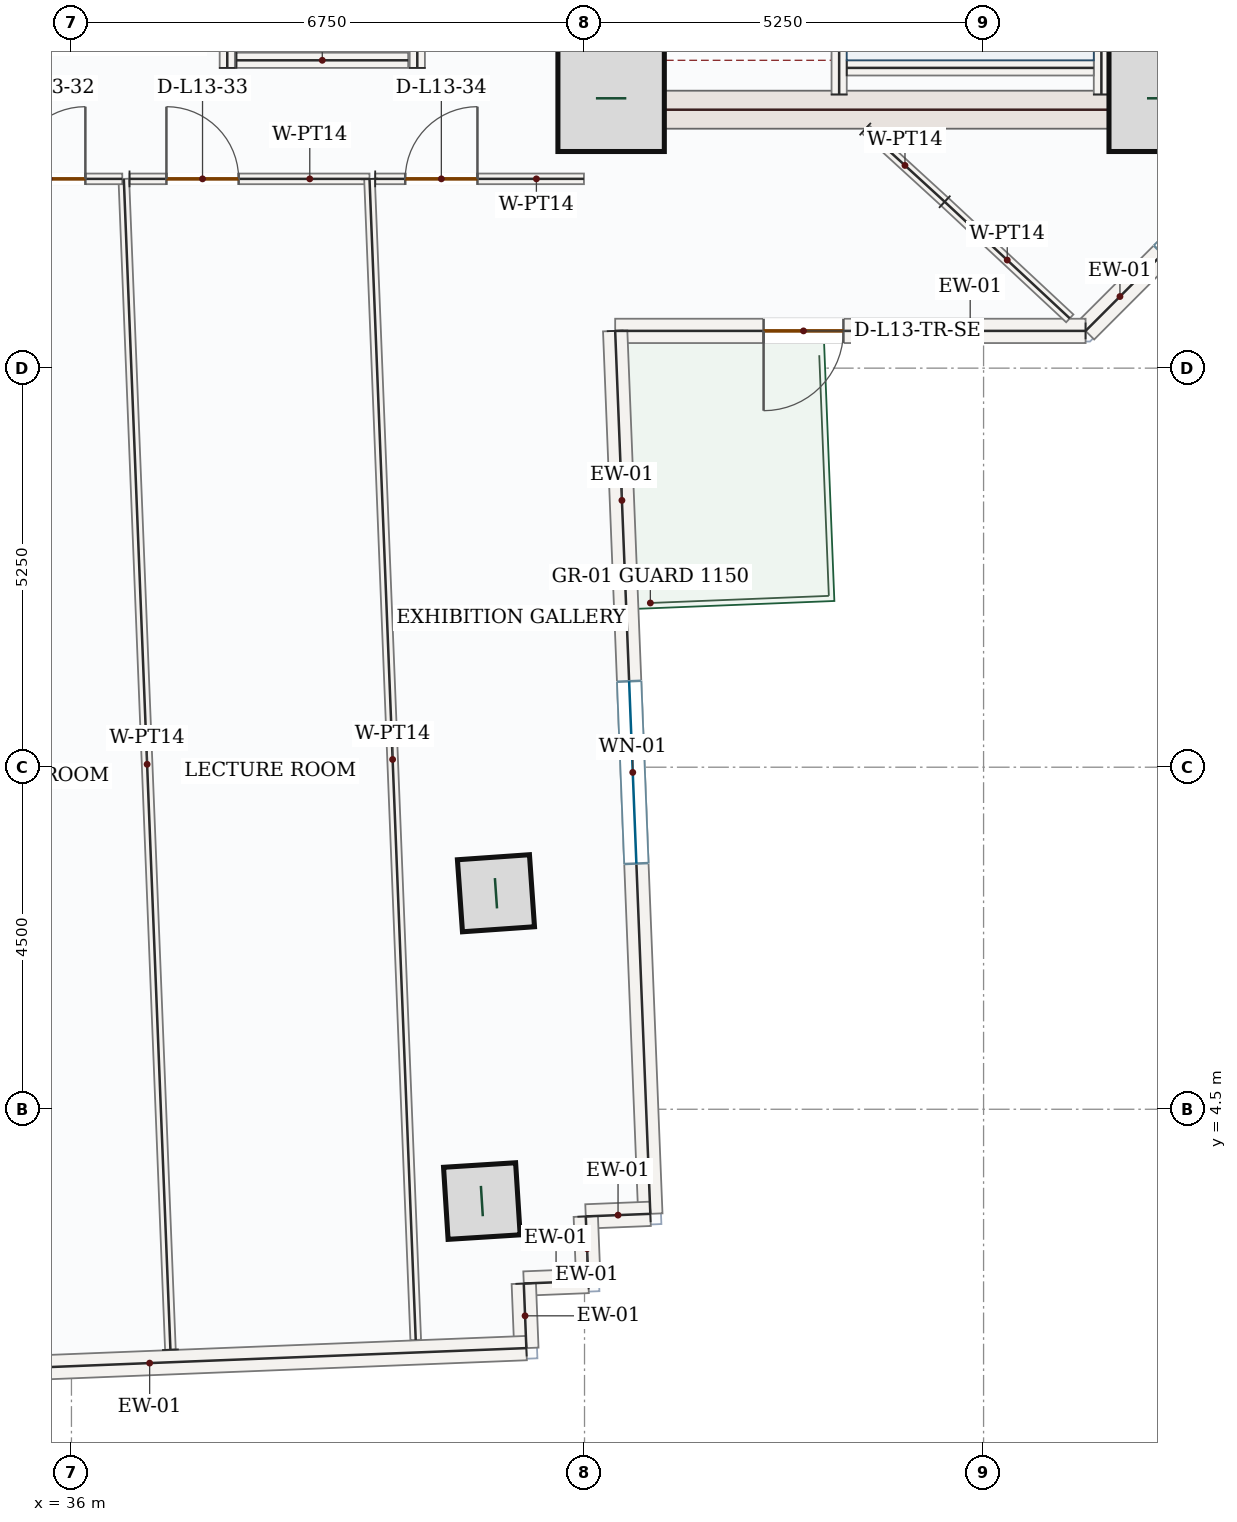
"""IFC4 building model, lengths in metres.
Left out: names, types, materials, properties, quantities, classifications, styles, units other than length and angle.
Written with IfcOpenShell. Run it as: python <this file> out.ifc"""

import sys

from ifc_helpers import new_model, si_unit, direction, frame, frame_2d, origin, origin_2d, place, context, subcontext, project, spatial, rectangle, hollow_rectangle, extrude, source, transform, mapped, element, fill, save


model = new_model("IFC4")
c1 = context("Model", 3, precision=1e-05, world=origin(), true_north=direction((0.0, 1.0)))
c2 = subcontext(c1, "Body", "Model", "MODEL_VIEW")
j1 = project(units=[si_unit("LENGTHUNIT", "METRE"), si_unit("PLANEANGLEUNIT", "RADIAN")], contexts=[c1])
p1 = place(None, origin())
s1 = spatial("IfcSite", under=j1, at=p1, CompositionType="ELEMENT")
p2 = place(p1, origin())
s2 = spatial("IfcBuilding", under=s1, at=p2, CompositionType="ELEMENT")
p3 = place(p2, frame((0.0, 0.0, 62.7)))
s3 = spatial("IfcBuildingStorey", under=s2, at=p3, CompositionType="ELEMENT", Elevation=62.7)
p4 = place(p3, frame((43.0, 17.4, 0.0), z_axis=(0.0, 0.0, 1.0), x_axis=(0.0, 1.0, 0.0)))
e1 = element("IfcWall", 1, at=p4, inside=s3, PredefinedType="SHEAR", context=c2, shape_type="SweptSolid", body=[
    extrude(rectangle(XDim=8.55, YDim=0.5, at=frame_2d((4.275, 0.0))), origin(), (0.0, 0.0, 1.0), 3.95),
])
p5 = place(p4, frame((6.65, 0.0, 0.0)))
e2 = element("IfcOpeningElement", 2, at=p5, cuts=e1, PredefinedType="OPENING", context=c2, shape_type="SweptSolid", body=[
    extrude(rectangle(XDim=1.1, YDim=2.2, at=frame_2d((0.55, 1.1))), frame((0.0, 0.26, 0.0), z_axis=(0.0, -1.0, 0.0), x_axis=(1.0, 0.0, 0.0)), (0.0, 0.0, 1.0), 0.52),
])
p6 = place(p4, frame((1.75, 0.0, 0.0)))
e3 = element("IfcOpeningElement", 3, at=p6, cuts=e1, PredefinedType="OPENING", context=c2, shape_type="SweptSolid", body=[
    extrude(rectangle(XDim=1.3, YDim=2.2, at=frame_2d((0.65, 1.1))), frame((0.0, 0.26, 0.0), z_axis=(0.0, -1.0, 0.0), x_axis=(1.0, 0.0, 0.0)), (0.0, 0.0, 1.0), 0.52),
])
p7 = place(p4, frame((4.3, 0.0, 0.0)))
e4 = element("IfcOpeningElement", 4, at=p7, cuts=e1, PredefinedType="OPENING", context=c2, shape_type="SweptSolid", body=[
    extrude(rectangle(XDim=0.88, YDim=2.1, at=frame_2d((0.44, 1.05))), frame((0.0, 0.26, 0.0), z_axis=(0.0, -1.0, 0.0), x_axis=(1.0, 0.0, 0.0)), (0.0, 0.0, 1.0), 0.52),
])
m1 = source(origin(), c2, "Body", "SweptSolid", [
    extrude(rectangle(XDim=8.55, YDim=0.5, at=frame_2d((4.275, 0.0))), origin(), (0.0, 0.0, 1.0), 3.95),
])
p8 = place(p3, frame((50.5, 17.4, 0.0), z_axis=(0.0, 0.0, 1.0), x_axis=(0.0, 1.0, 0.0)))
e5 = element("IfcWall", 5, at=p8, inside=s3, PredefinedType="SHEAR", context=c2, shape_type="MappedRepresentation", body=[
    mapped(m1, transform((0.0, 0.0, 0.0), x_axis=(1.0, 0.0, 0.0), y_axis=(0.0, 1.0, 0.0), z_axis=(0.0, 0.0, 1.0), scale=1.0)),
])
m2 = source(origin(), c2, "Body", "SweptSolid", [
    extrude(rectangle(XDim=7.0, YDim=0.5, at=frame_2d((3.5, 0.0))), origin(), (0.0, 0.0, 1.0), 3.95),
])
p9 = place(p3, frame((43.25, 17.65, 0.0), z_axis=(0.0, 0.0, 1.0), x_axis=(1.0, 0.0, 0.0)))
e6 = element("IfcWall", 6, at=p9, inside=s3, PredefinedType="SHEAR", context=c2, shape_type="MappedRepresentation", body=[
    mapped(m2, transform((0.0, 0.0, 0.0), x_axis=(1.0, 0.0, 0.0), y_axis=(0.0, 1.0, 0.0), z_axis=(0.0, 0.0, 1.0), scale=1.0)),
])
m3 = source(origin(), c2, "Body", "SweptSolid", [
    extrude(rectangle(XDim=1.4, YDim=1.4, at=origin_2d()), origin(), (0.0, 0.0, 1.0), 4.2),
])
for number, where, z_axis, x_axis in (
    (7, (43.1, 17.8, 0.0), (0.0, 0.0, 1.0), (1.0, 0.0, 0.0)),
    (8, (50.35, 17.8, 0.0), (0.0, 0.0, 1.0), (1.0, 0.0, 0.0)),
):
    element("IfcColumn", number, at=place(p3, frame(where, z_axis=z_axis, x_axis=x_axis)), inside=s3, PredefinedType="COLUMN", context=c2, shape_type="MappedRepresentation", body=[
        mapped(m3, transform((0.0, 0.0, 0.0), x_axis=(1.0, 0.0, 0.0), y_axis=(0.0, 1.0, 0.0), z_axis=(0.0, 0.0, 1.0), scale=1.0)),
    ])
m4 = source(origin(), c2, "Body", "SweptSolid", [
    extrude(hollow_rectangle(XDim=0.95, YDim=0.95, WallThickness=0.05, at=origin_2d()), origin(), (0.0, 0.0, 1.0), 4.2),
])
for number, where, z_axis, x_axis in (
    (9, (41.585, 7.342, 0.0), (0.0, 0.0, 1.0), (-0.07, 0.998, 0.0)),
    (10, (41.399, 3.292, 0.0), (0.0, 0.0, 1.0), (-0.063, 0.998, 0.0)),
):
    element("IfcColumn", number, at=place(p3, frame(where, z_axis=z_axis, x_axis=x_axis)), inside=s3, PredefinedType="COLUMN", context=c2, shape_type="MappedRepresentation", body=[
        mapped(m4, transform((0.0, 0.0, 0.0), x_axis=(1.0, 0.0, 0.0), y_axis=(0.0, 1.0, 0.0), z_axis=(0.0, 0.0, 1.0), scale=1.0)),
    ])
p10 = place(p3, frame((53.06, 18.458, 0.0), z_axis=(0.0, 0.0, 1.0), x_axis=(-0.707106781187, -0.707106781187, 0.0)))
e11 = element("IfcWall", 11, at=p10, inside=s3, PredefinedType="SOLIDWALL", context=c2, shape_type="SweptSolid", body=[
    extrude(rectangle(XDim=5.258, YDim=0.32, at=frame_2d((2.629, 0.0))), origin(), (0.0, 0.0, 1.0), 3.95),
])
p11 = place(p10, frame((1.429, 0.0, 0.85)))
e12 = element("IfcOpeningElement", 12, at=p11, cuts=e11, PredefinedType="OPENING", context=c2, shape_type="SweptSolid", body=[
    extrude(rectangle(XDim=2.4, YDim=1.8, at=frame_2d((1.2, 0.9))), frame((0.0, 0.17, 0.0), z_axis=(0.0, -1.0, 0.0), x_axis=(1.0, 0.0, 0.0)), (0.0, 0.0, 1.0), 0.34),
])
p12 = place(p3, frame((49.342, 14.74, 0.0), z_axis=(0.0, 0.0, 1.0), x_axis=(-1.0, 0.0, 0.0)))
e13 = element("IfcWall", 13, at=p12, inside=s3, PredefinedType="SOLIDWALL", context=c2, shape_type="SweptSolid", body=[
    extrude(rectangle(XDim=6.189, YDim=0.32, at=frame_2d((3.094, 0.0))), origin(), (0.0, 0.0, 1.0), 3.95),
])
p13 = place(p12, frame((3.186, 0.0, 0.0)))
e14 = element("IfcOpeningElement", 14, at=p13, cuts=e13, PredefinedType="OPENING", context=c2, shape_type="SweptSolid", body=[
    extrude(rectangle(XDim=1.05, YDim=2.15, at=frame_2d((0.525, 1.075))), frame((0.0, 0.17, 0.0), z_axis=(0.0, -1.0, 0.0), x_axis=(1.0, 0.0, 0.0)), (0.0, 0.0, 1.0), 0.34),
])
p14 = place(p3, frame((43.153, 14.74, 0.0), z_axis=(0.0, 0.0, 1.0), x_axis=(0.039775975357, -0.999208622753, 0.0)))
e15 = element("IfcWall", 15, at=p14, inside=s3, PredefinedType="SOLIDWALL", context=c2, shape_type="SweptSolid", body=[
    extrude(rectangle(XDim=11.625, YDim=0.32, at=frame_2d((5.812, 0.0))), origin(), (0.0, 0.0, 1.0), 3.95),
])
p15 = place(p14, frame((4.613, 0.0, 0.85)))
e16 = element("IfcOpeningElement", 16, at=p15, cuts=e15, PredefinedType="OPENING", context=c2, shape_type="SweptSolid", body=[
    extrude(rectangle(XDim=2.4, YDim=1.8, at=frame_2d((1.2, 0.9))), frame((0.0, 0.17, 0.0), z_axis=(0.0, -1.0, 0.0), x_axis=(1.0, 0.0, 0.0)), (0.0, 0.0, 1.0), 0.34),
])
m5 = source(origin(), c2, "Body", "SweptSolid", [
    extrude(rectangle(XDim=0.85, YDim=0.32, at=frame_2d((0.425, 0.0))), origin(), (0.0, 0.0, 1.0), 3.95),
])
for number, where, z_axis, x_axis in (
    (17, (43.616, 3.124, 0.0), (0.0, 0.0, 1.0), (-0.999, -0.04, 0.0)),
    (18, (42.767, 3.09, 0.0), (0.0, 0.0, 1.0), (0.04, -0.999, 0.0)),
):
    element("IfcWall", number, at=place(p3, frame(where, z_axis=z_axis, x_axis=x_axis)), inside=s3, PredefinedType="SOLIDWALL", context=c2, shape_type="MappedRepresentation", body=[
        mapped(m5, transform((0.0, 0.0, 0.0), x_axis=(1.0, 0.0, 0.0), y_axis=(0.0, 1.0, 0.0), z_axis=(0.0, 0.0, 1.0), scale=1.0)),
    ])
m6 = source(origin(), c2, "Body", "SweptSolid", [
    extrude(rectangle(XDim=0.85, YDim=0.32, at=frame_2d((0.425, 0.0))), origin(), (0.0, 0.0, 1.0), 3.95),
])
p16 = place(p3, frame((42.8, 2.241, 0.0), z_axis=(0.0, 0.0, 1.0), x_axis=(-0.999202792875, -0.039922158152, 0.0)))
e19 = element("IfcWall", 19, at=p16, inside=s3, PredefinedType="SOLIDWALL", context=c2, shape_type="MappedRepresentation", body=[
    mapped(m6, transform((0.0, 0.0, 0.0), x_axis=(1.0, 0.0, 0.0), y_axis=(0.0, 1.0, 0.0), z_axis=(0.0, 0.0, 1.0), scale=1.0)),
])
p17 = place(p3, frame((41.951, 2.207, 0.0), z_axis=(0.0, 0.0, 1.0), x_axis=(0.039933618331, -0.999202334929, 0.0)))
e20 = element("IfcWall", 20, at=p17, inside=s3, PredefinedType="SOLIDWALL", context=c2, shape_type="MappedRepresentation", body=[
    mapped(m5, transform((0.0, 0.0, 0.0), x_axis=(1.0, 0.0, 0.0), y_axis=(0.0, 1.0, 0.0), z_axis=(0.0, 0.0, 1.0), scale=1.0)),
])
m7 = source(origin(), c2, "Body", "SweptSolid", [
    extrude(rectangle(XDim=9.92, YDim=0.32, at=frame_2d((4.96, 0.0))), origin(), (0.0, 0.0, 1.0), 3.95),
])
p18 = place(p3, frame((41.985, 1.358, 0.0), z_axis=(0.0, 0.0, 1.0), x_axis=(-0.999207823998, -0.039796035749, 0.0)))
e21 = element("IfcWall", 21, at=p18, inside=s3, PredefinedType="SOLIDWALL", context=c2, shape_type="MappedRepresentation", body=[
    mapped(m7, transform((0.0, 0.0, 0.0), x_axis=(1.0, 0.0, 0.0), y_axis=(0.0, 1.0, 0.0), z_axis=(0.0, 0.0, 1.0), scale=1.0)),
])
m8 = source(origin(), c2, "Body", "SweptSolid", [
    extrude(rectangle(XDim=7.87, YDim=0.2, at=frame_2d((3.935, 0.0))), origin(), (0.0, 0.0, 1.0), 3.95),
])
p19 = place(p3, frame((49.55, 17.85, 0.0), z_axis=(0.0, 0.0, 1.0), x_axis=(0.0, 1.0, 0.0)))
e22 = element("IfcWall", 22, at=p19, inside=s3, PredefinedType="SOLIDWALL", context=c2, shape_type="MappedRepresentation", body=[
    mapped(m8, transform((0.0, 0.0, 0.0), x_axis=(1.0, 0.0, 0.0), y_axis=(0.0, 1.0, 0.0), z_axis=(0.0, 0.0, 1.0), scale=1.0)),
])
p20 = place(p3, frame((46.1, 17.85, 0.0), z_axis=(0.0, 0.0, 1.0), x_axis=(0.0, 1.0, 0.0)))
e23 = element("IfcWall", 23, at=p20, inside=s3, PredefinedType="SOLIDWALL", context=c2, shape_type="SweptSolid", body=[
    extrude(rectangle(XDim=8.0, YDim=0.2, at=frame_2d((4.0, 0.0))), origin(), (0.0, 0.0, 1.0), 3.95),
])
p21 = place(p20, frame((6.3, 0.0, 0.0)))
e24 = element("IfcOpeningElement", 24, at=p21, cuts=e23, PredefinedType="OPENING", context=c2, shape_type="SweptSolid", body=[
    extrude(rectangle(XDim=1.05, YDim=2.15, at=frame_2d((0.525, 1.075))), frame((0.0, 0.11, 0.0), z_axis=(0.0, -1.0, 0.0), x_axis=(1.0, 0.0, 0.0)), (0.0, 0.0, 1.0), 0.22),
])
m9 = source(origin(), c2, "Body", "SweptSolid", [
    extrude(rectangle(XDim=3.25, YDim=0.2, at=frame_2d((1.625, 0.0))), origin(), (0.0, 0.0, 1.0), 3.95),
])
p22 = place(p3, frame((46.2, 18.2, 0.0), z_axis=(0.0, 0.0, 1.0), x_axis=(1.0, 0.0, 0.0)))
e25 = element("IfcWall", 25, at=p22, inside=s3, PredefinedType="SOLIDWALL", context=c2, shape_type="MappedRepresentation", body=[
    mapped(m9, transform((0.0, 0.0, 0.0), x_axis=(1.0, 0.0, 0.0), y_axis=(0.0, 1.0, 0.0), z_axis=(0.0, 0.0, 1.0), scale=1.0)),
])
m10 = source(origin(), c2, "Body", "SweptSolid", [
    extrude(rectangle(XDim=2.35, YDim=0.2, at=frame_2d((1.175, 0.0))), origin(), (0.0, 0.0, 1.0), 3.95),
])
for number, where, z_axis, x_axis in (
    (26, (38.05, 18.2, 0.0), (0.0, 0.0, 1.0), (0.0, 1.0, 0.0)),
    (27, (40.55, 18.2, 0.0), (0.0, 0.0, 1.0), (0.0, 1.0, 0.0)),
):
    element("IfcWall", number, at=place(p3, frame(where, z_axis=z_axis, x_axis=x_axis)), inside=s3, PredefinedType="SOLIDWALL", context=c2, shape_type="MappedRepresentation", body=[
        mapped(m10, transform((0.0, 0.0, 0.0), x_axis=(1.0, 0.0, 0.0), y_axis=(0.0, 1.0, 0.0), z_axis=(0.0, 0.0, 1.0), scale=1.0)),
    ])
m11 = source(origin(), c2, "Body", "SweptSolid", [
    extrude(rectangle(XDim=2.26, YDim=0.2, at=frame_2d((1.13, 0.0))), origin(), (0.0, 0.0, 1.0), 3.95),
])
p23 = place(p3, frame((38.17, 18.3, 0.0), z_axis=(0.0, 0.0, 1.0), x_axis=(1.0, 0.0, 0.0)))
e28 = element("IfcWall", 28, at=p23, inside=s3, PredefinedType="SOLIDWALL", context=c2, shape_type="MappedRepresentation", body=[
    mapped(m11, transform((0.0, 0.0, 0.0), x_axis=(1.0, 0.0, 0.0), y_axis=(0.0, 1.0, 0.0), z_axis=(0.0, 0.0, 1.0), scale=1.0)),
])
m12 = source(origin(), c2, "Body", "SweptSolid", [
    extrude(rectangle(XDim=15.416, YDim=0.14, at=frame_2d((7.708, 0.0))), origin(), (0.0, 0.0, 1.0), 3.95),
])
p24 = place(p3, frame((37.302, 1.336, 0.0), z_axis=(0.0, 0.0, 1.0), x_axis=(-0.039782723686, 0.999208354096, 0.0)))
e29 = element("IfcWall", 29, at=p24, inside=s3, PredefinedType="PARTITIONING", context=c2, shape_type="MappedRepresentation", body=[
    mapped(m12, transform((0.0, 0.0, 0.0), x_axis=(1.0, 0.0, 0.0), y_axis=(0.0, 1.0, 0.0), z_axis=(0.0, 0.0, 1.0), scale=1.0)),
])
p25 = place(p3, frame((36.764, 16.74, 0.0), z_axis=(0.0, 0.0, 1.0), x_axis=(1.0, 0.0, 0.0)))
e30 = element("IfcWall", 30, at=p25, inside=s3, PredefinedType="PARTITIONING", context=c2, shape_type="SweptSolid", body=[
    extrude(rectangle(XDim=3.157, YDim=0.14, at=frame_2d((1.579, 0.0))), origin(), (0.0, 0.0, 1.0), 3.95),
])
p26 = place(p25, frame((0.486, 0.0, 0.0)))
e31 = element("IfcOpeningElement", 31, at=p26, cuts=e30, PredefinedType="OPENING", context=c2, shape_type="SweptSolid", body=[
    extrude(rectangle(XDim=0.95, YDim=2.15, at=frame_2d((0.475, 1.075))), frame((0.0, 0.08, 0.0), z_axis=(0.0, -1.0, 0.0), x_axis=(1.0, 0.0, 0.0)), (0.0, 0.0, 1.0), 0.16),
])
m13 = source(origin(), c2, "Body", "SweptSolid", [
    extrude(rectangle(XDim=15.286, YDim=0.14, at=frame_2d((7.643, 0.0))), origin(), (0.0, 0.0, 1.0), 3.95),
])
p27 = place(p3, frame((39.921, 16.739, 0.0), z_axis=(0.0, 0.0, 1.0), x_axis=(0.039769031662, -0.99920889914, 0.0)))
e32 = element("IfcWall", 32, at=p27, inside=s3, PredefinedType="PARTITIONING", context=c2, shape_type="MappedRepresentation", body=[
    mapped(m13, transform((0.0, 0.0, 0.0), x_axis=(1.0, 0.0, 0.0), y_axis=(0.0, 1.0, 0.0), z_axis=(0.0, 0.0, 1.0), scale=1.0)),
])
p28 = place(p3, frame((33.511, 16.74, 0.0), z_axis=(0.0, 0.0, 1.0), x_axis=(1.0, 0.0, 0.0)))
e33 = element("IfcWall", 33, at=p28, inside=s3, PredefinedType="PARTITIONING", context=c2, shape_type="SweptSolid", body=[
    extrude(rectangle(XDim=3.157, YDim=0.14, at=frame_2d((1.579, 0.0))), origin(), (0.0, 0.0, 1.0), 3.95),
])
p29 = place(p28, frame((1.722, 0.0, 0.0)))
e34 = element("IfcOpeningElement", 34, at=p29, cuts=e33, PredefinedType="OPENING", context=c2, shape_type="SweptSolid", body=[
    extrude(rectangle(XDim=0.95, YDim=2.15, at=frame_2d((0.475, 1.075))), frame((0.0, 0.08, 0.0), z_axis=(0.0, -1.0, 0.0), x_axis=(1.0, 0.0, 0.0)), (0.0, 0.0, 1.0), 0.16),
])
p30 = place(p3, frame((39.996, 16.74, 0.0), z_axis=(0.0, 0.0, 1.0), x_axis=(0.999999996048, 8.8904694e-05, 0.0)))
e35 = element("IfcWall", 35, at=p30, inside=s3, PredefinedType="PARTITIONING", context=c2, shape_type="SweptSolid", body=[
    extrude(rectangle(XDim=2.746, YDim=0.14, at=frame_2d((1.373, 0.0))), origin(), (0.0, 0.0, 1.0), 3.95),
])
p31 = place(p30, frame((0.395, 0.0, 0.0)))
e36 = element("IfcOpeningElement", 36, at=p31, cuts=e35, PredefinedType="OPENING", context=c2, shape_type="SweptSolid", body=[
    extrude(rectangle(XDim=0.95, YDim=2.15, at=frame_2d((0.475, 1.075))), frame((0.0, 0.08, 0.0), z_axis=(0.0, -1.0, 0.0), x_axis=(1.0, 0.0, 0.0)), (0.0, 0.0, 1.0), 0.16),
])
m14 = source(origin(), c2, "Body", "SweptSolid", [
    extrude(rectangle(XDim=1.417, YDim=0.14, at=frame_2d((0.708, 0.0))), origin(), (0.0, 0.0, 1.0), 3.95),
])
p32 = place(p3, frame((46.443, 17.395, 0.0), z_axis=(0.0, 0.0, 1.0), x_axis=(0.737776192982, -0.675045397784, 0.0)))
e37 = element("IfcWall", 37, at=p32, inside=s3, PredefinedType="PARTITIONING", context=c2, shape_type="MappedRepresentation", body=[
    mapped(m14, transform((0.0, 0.0, 0.0), x_axis=(1.0, 0.0, 0.0), y_axis=(0.0, 1.0, 0.0), z_axis=(0.0, 0.0, 1.0), scale=1.0)),
])
m15 = source(origin(), c2, "Body", "SweptSolid", [
    extrude(rectangle(XDim=2.25, YDim=0.14, at=frame_2d((1.125, 0.0))), origin(), (0.0, 0.0, 1.0), 3.95),
])
p33 = place(p3, frame((47.489, 16.439, 0.0), z_axis=(0.0, 0.0, 1.0), x_axis=(0.731524295554, -0.68181537458, 0.0)))
e38 = element("IfcWall", 38, at=p33, inside=s3, PredefinedType="PARTITIONING", context=c2, shape_type="MappedRepresentation", body=[
    mapped(m15, transform((0.0, 0.0, 0.0), x_axis=(1.0, 0.0, 0.0), y_axis=(0.0, 1.0, 0.0), z_axis=(0.0, 0.0, 1.0), scale=1.0)),
])
m16 = source(origin(), c2, "Body", "SweptSolid", [
    extrude(rectangle(XDim=1.05, YDim=2.15, at=frame_2d((0.525, 1.075))), frame((0.0, 0.025, 0.0), z_axis=(0.0, -1.0, 0.0), x_axis=(1.0, 0.0, 0.0)), (0.0, 0.0, 1.0), 0.05),
])
p34 = place(p13, origin())
e39 = element("IfcDoor", 39, at=p34, inside=s3, OperationType="SINGLE_SWING_RIGHT", PredefinedType="DOOR", context=c2, shape_type="MappedRepresentation", body=[
    mapped(m16, transform((0.0, 0.0, 0.0), x_axis=(1.0, 0.0, 0.0), y_axis=(0.0, 1.0, 0.0), z_axis=(0.0, 0.0, 1.0), scale=1.0)),
])
fill(e14, e39)
m17 = source(origin(), c2, "Body", "SweptSolid", [
    extrude(rectangle(XDim=2.4, YDim=1.8, at=frame_2d((1.2, 0.9))), frame((0.0, 0.03, 0.0), z_axis=(0.0, -1.0, 0.0), x_axis=(1.0, 0.0, 0.0)), (0.0, 0.0, 1.0), 0.06),
])
p35 = place(p15, origin())
e40 = element("IfcWindow", 40, at=p35, inside=s3, PartitioningType="DOUBLE_PANEL_VERTICAL", PredefinedType="WINDOW", context=c2, shape_type="MappedRepresentation", body=[
    mapped(m17, transform((0.0, 0.0, 0.0), x_axis=(1.0, 0.0, 0.0), y_axis=(0.0, 1.0, 0.0), z_axis=(0.0, 0.0, 1.0), scale=1.0)),
])
fill(e16, e40)
m18 = source(origin(), c2, "Body", "SweptSolid", [
    extrude(rectangle(XDim=0.95, YDim=2.15, at=frame_2d((0.475, 1.075))), frame((0.0, 0.025, 0.0), z_axis=(0.0, -1.0, 0.0), x_axis=(1.0, 0.0, 0.0)), (0.0, 0.0, 1.0), 0.05),
])
p36 = place(p29, origin())
e41 = element("IfcDoor", 41, at=p36, inside=s3, OperationType="SINGLE_SWING_RIGHT", PredefinedType="DOOR", context=c2, shape_type="MappedRepresentation", body=[
    mapped(m18, transform((0.0, 0.0, 0.0), x_axis=(1.0, 0.0, 0.0), y_axis=(0.0, 1.0, 0.0), z_axis=(0.0, 0.0, 1.0), scale=1.0)),
])
fill(e34, e41)
p37 = place(p26, origin())
e42 = element("IfcDoor", 42, at=p37, inside=s3, OperationType="SINGLE_SWING_LEFT", PredefinedType="DOOR", context=c2, shape_type="MappedRepresentation", body=[
    mapped(m18, transform((0.0, 0.0, 0.0), x_axis=(1.0, 0.0, 0.0), y_axis=(0.0, 1.0, 0.0), z_axis=(0.0, 0.0, 1.0), scale=1.0)),
])
fill(e31, e42)
p38 = place(p31, origin())
e43 = element("IfcDoor", 43, at=p38, inside=s3, OperationType="SINGLE_SWING_RIGHT", PredefinedType="DOOR", context=c2, shape_type="MappedRepresentation", body=[
    mapped(m18, transform((0.0, 0.0, 0.0), x_axis=(1.0, 0.0, 0.0), y_axis=(0.0, 1.0, 0.0), z_axis=(0.0, 0.0, 1.0), scale=1.0)),
])
fill(e36, e43)
save(model, sys.argv[1])
